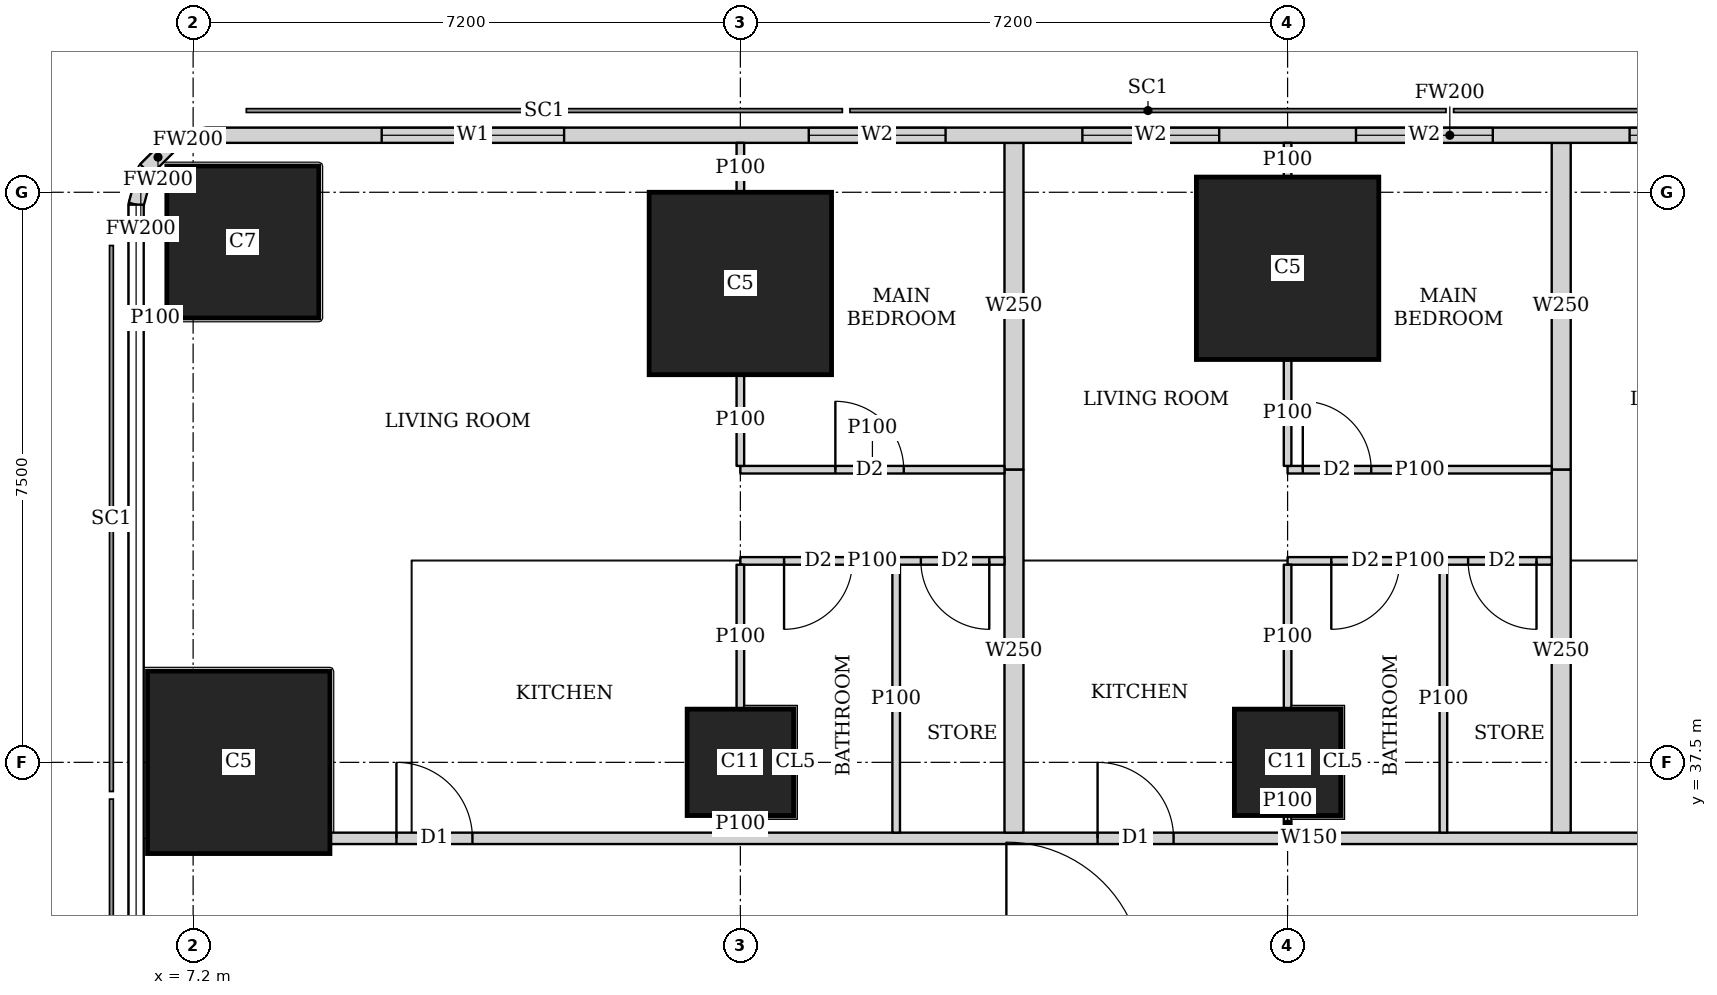
"""IFC4 building model, lengths in metres.
Left out: names, types, materials, properties, quantities, classifications, styles, units other than length and angle.
Written with IfcOpenShell. Run it as: python <this file> out.ifc"""

import sys

from ifc_helpers import new_model, si_unit, direction, frame, frame_2d, origin, origin_2d, place, context, subcontext, project, spatial, rectangle, extrude, element, fill, save


model = new_model("IFC4")
c1 = context("Model", 3, precision=1e-05, world=origin(), true_north=direction((0.0, 1.0)))
c2 = subcontext(c1, "Body", "Model", "MODEL_VIEW")
j1 = project(units=[si_unit("LENGTHUNIT", "METRE"), si_unit("PLANEANGLEUNIT", "RADIAN")], contexts=[c1])
p1 = place(None, origin())
s1 = spatial("IfcSite", under=j1, at=p1, CompositionType="ELEMENT")
p2 = place(p1, origin())
s2 = spatial("IfcBuilding", under=s1, at=p2, CompositionType="ELEMENT")
p3 = place(p2, frame((0.0, 0.0, 212.45)))
s3 = spatial("IfcBuildingStorey", under=s2, at=p3, CompositionType="ELEMENT", Elevation=212.45)
p4 = place(p3, frame((7.8, 37.5, 0.0), z_axis=(0.0, 0.0, 1.0), x_axis=(1.0, 0.0, 0.0)))
e1 = element("IfcColumn", 1, at=p4, inside=s3, PredefinedType="COLUMN", context=c2, shape_type="SweptSolid", body=[
    extrude(rectangle(XDim=2.4, YDim=2.4, at=origin_2d()), origin(), (0.0, 0.0, 1.0), 3.75),
])
for number, where, z_axis, x_axis in (
    (2, (14.4, 37.5, 0.0), (0.0, 0.0, 1.0), (1.0, 0.0, 0.0)),
    (3, (21.6, 37.5, 0.0), (0.0, 0.0, 1.0), (1.0, 0.0, 0.0)),
):
    element("IfcColumn", number, at=place(p3, frame(where, z_axis=z_axis, x_axis=x_axis)), inside=s3, PredefinedType="COLUMN", context=c2, shape_type="SweptSolid", body=[
        extrude(rectangle(XDim=1.4, YDim=1.4, at=origin_2d()), origin(), (0.0, 0.0, 1.0), 3.75),
    ])
p5 = place(p3, frame((7.854, 44.346, 0.0), z_axis=(0.0, 0.0, 1.0), x_axis=(1.0, 0.0, 0.0)))
e4 = element("IfcColumn", 4, at=p5, inside=s3, PredefinedType="COLUMN", context=c2, shape_type="SweptSolid", body=[
    extrude(rectangle(XDim=2.0, YDim=2.0, at=origin_2d()), origin(), (0.0, 0.0, 1.0), 3.75),
])
for number, where, z_axis, x_axis in (
    (5, (14.4, 43.8, 0.0), (0.0, 0.0, 1.0), (1.0, 0.0, 0.0)),
    (6, (21.6, 44.0, 0.0), (0.0, 0.0, 1.0), (1.0, 0.0, 0.0)),
):
    element("IfcColumn", number, at=place(p3, frame(where, z_axis=z_axis, x_axis=x_axis)), inside=s3, PredefinedType="COLUMN", context=c2, shape_type="SweptSolid", body=[
        extrude(rectangle(XDim=2.4, YDim=2.4, at=origin_2d()), origin(), (0.0, 0.0, 1.0), 3.75),
    ])
p6 = place(p3, frame((40.106, 45.75, 0.0), z_axis=(0.0, 0.0, 1.0), x_axis=(-1.0, 0.0, 0.0)))
e7 = element("IfcWall", 7, at=p6, inside=s3, PredefinedType="SOLIDWALL", context=c2, shape_type="SweptSolid", body=[
    extrude(rectangle(XDim=32.743, YDim=0.2, at=frame_2d((16.372, 0.0))), origin(), (0.0, 0.0, 1.0), 3.5),
])
p7 = place(p6, frame((8.606, 0.0, 0.9)))
e8 = element("IfcOpeningElement", 8, at=p7, cuts=e7, PredefinedType="OPENING", context=c2, shape_type="SweptSolid", body=[
    extrude(rectangle(XDim=1.8, YDim=1.5, at=frame_2d((0.9, 0.75))), frame((0.0, 0.11, 0.0), z_axis=(0.0, -1.0, 0.0), x_axis=(1.0, 0.0, 0.0)), (0.0, 0.0, 1.0), 0.22),
])
p8 = place(p6, frame((12.206, 0.0, 0.9)))
e9 = element("IfcOpeningElement", 9, at=p8, cuts=e7, PredefinedType="OPENING", context=c2, shape_type="SweptSolid", body=[
    extrude(rectangle(XDim=1.8, YDim=1.5, at=frame_2d((0.9, 0.75))), frame((0.0, 0.11, 0.0), z_axis=(0.0, -1.0, 0.0), x_axis=(1.0, 0.0, 0.0)), (0.0, 0.0, 1.0), 0.22),
])
p9 = place(p6, frame((15.806, 0.0, 0.9)))
e10 = element("IfcOpeningElement", 10, at=p9, cuts=e7, PredefinedType="OPENING", context=c2, shape_type="SweptSolid", body=[
    extrude(rectangle(XDim=1.8, YDim=1.5, at=frame_2d((0.9, 0.75))), frame((0.0, 0.11, 0.0), z_axis=(0.0, -1.0, 0.0), x_axis=(1.0, 0.0, 0.0)), (0.0, 0.0, 1.0), 0.22),
])
p10 = place(p6, frame((19.406, 0.0, 0.9)))
e11 = element("IfcOpeningElement", 11, at=p10, cuts=e7, PredefinedType="OPENING", context=c2, shape_type="SweptSolid", body=[
    extrude(rectangle(XDim=1.8, YDim=1.5, at=frame_2d((0.9, 0.75))), frame((0.0, 0.11, 0.0), z_axis=(0.0, -1.0, 0.0), x_axis=(1.0, 0.0, 0.0)), (0.0, 0.0, 1.0), 0.22),
])
p11 = place(p6, frame((23.006, 0.0, 0.9)))
e12 = element("IfcOpeningElement", 12, at=p11, cuts=e7, PredefinedType="OPENING", context=c2, shape_type="SweptSolid", body=[
    extrude(rectangle(XDim=1.8, YDim=1.5, at=frame_2d((0.9, 0.75))), frame((0.0, 0.11, 0.0), z_axis=(0.0, -1.0, 0.0), x_axis=(1.0, 0.0, 0.0)), (0.0, 0.0, 1.0), 0.22),
])
p12 = place(p6, frame((28.025, 0.0, 0.9)))
e13 = element("IfcOpeningElement", 13, at=p12, cuts=e7, PredefinedType="OPENING", context=c2, shape_type="SweptSolid", body=[
    extrude(rectangle(XDim=2.4, YDim=1.5, at=frame_2d((1.2, 0.75))), frame((0.0, 0.11, 0.0), z_axis=(0.0, -1.0, 0.0), x_axis=(1.0, 0.0, 0.0)), (0.0, 0.0, 1.0), 0.22),
])
p13 = place(p3, frame((7.363, 45.75, 0.0), z_axis=(0.0, 0.0, 1.0), x_axis=(-0.965655254015, -0.259826731483, 0.0)))
e14 = element("IfcWall", 14, at=p13, inside=s3, PredefinedType="SOLIDWALL", context=c2, shape_type="SweptSolid", body=[
    extrude(rectangle(XDim=0.477, YDim=0.2, at=frame_2d((0.239, 0.0))), origin(), (0.0, 0.0, 1.0), 3.5),
])
p14 = place(p3, frame((6.902, 45.626, 0.0), z_axis=(0.0, 0.0, 1.0), x_axis=(-0.707369890659, -0.706843573776, 0.0)))
e15 = element("IfcWall", 15, at=p14, inside=s3, PredefinedType="SOLIDWALL", context=c2, shape_type="SweptSolid", body=[
    extrude(rectangle(XDim=0.464, YDim=0.2, at=frame_2d((0.232, 0.0))), origin(), (0.0, 0.0, 1.0), 3.5),
])
p15 = place(p3, frame((6.574, 45.298, 0.0), z_axis=(0.0, 0.0, 1.0), x_axis=(-0.259698463175, -0.965689757751, 0.0)))
e16 = element("IfcWall", 16, at=p15, inside=s3, PredefinedType="SOLIDWALL", context=c2, shape_type="SweptSolid", body=[
    extrude(rectangle(XDim=0.478, YDim=0.2, at=frame_2d((0.239, 0.0))), origin(), (0.0, 0.0, 1.0), 3.5),
])
p16 = place(p3, frame((9.001, 36.5, 0.0), z_axis=(0.0, 0.0, 1.0), x_axis=(1.0, 0.0, 0.0)))
e17 = element("IfcWall", 17, at=p16, inside=s3, PredefinedType="SOLIDWALL", context=c2, shape_type="SweptSolid", body=[
    extrude(rectangle(XDim=25.764, YDim=0.15, at=frame_2d((12.882, 0.0))), origin(), (0.0, 0.0, 1.0), 3.5),
])
p17 = place(p16, frame((0.874, 0.0, 0.0)))
e18 = element("IfcOpeningElement", 18, at=p17, cuts=e17, PredefinedType="OPENING", context=c2, shape_type="SweptSolid", body=[
    extrude(rectangle(XDim=1.0, YDim=2.1, at=frame_2d((0.5, 1.05))), frame((0.0, 0.085, 0.0), z_axis=(0.0, -1.0, 0.0), x_axis=(1.0, 0.0, 0.0)), (0.0, 0.0, 1.0), 0.17),
])
p18 = place(p16, frame((10.099, 0.0, 0.0)))
e19 = element("IfcOpeningElement", 19, at=p18, cuts=e17, PredefinedType="OPENING", context=c2, shape_type="SweptSolid", body=[
    extrude(rectangle(XDim=1.0, YDim=2.1, at=frame_2d((0.5, 1.05))), frame((0.0, 0.085, 0.0), z_axis=(0.0, -1.0, 0.0), x_axis=(1.0, 0.0, 0.0)), (0.0, 0.0, 1.0), 0.17),
])
p19 = place(p16, frame((17.356, 0.0, 0.0)))
e20 = element("IfcOpeningElement", 20, at=p19, cuts=e17, PredefinedType="OPENING", context=c2, shape_type="SweptSolid", body=[
    extrude(rectangle(XDim=1.0, YDim=2.1, at=frame_2d((0.5, 1.05))), frame((0.0, 0.085, 0.0), z_axis=(0.0, -1.0, 0.0), x_axis=(1.0, 0.0, 0.0)), (0.0, 0.0, 1.0), 0.17),
])
p20 = place(p3, frame((6.854, 43.346, 0.0), z_axis=(0.0, 0.0, 1.0), x_axis=(-1.0, 0.0, 0.0)))
e21 = element("IfcWall", 21, at=p20, inside=s3, PredefinedType="PARTITIONING", context=c2, shape_type="SweptSolid", body=[
    extrude(rectangle(XDim=0.304, YDim=0.1, at=frame_2d((0.152, 0.0))), origin(), (0.0, 0.0, 1.0), 2.05),
])
p21 = place(p3, frame((14.4, 41.35, 0.0), z_axis=(0.0, 0.0, 1.0), x_axis=(1.0, 0.0, 0.0)))
e22 = element("IfcWall", 22, at=p21, inside=s3, PredefinedType="PARTITIONING", context=c2, shape_type="SweptSolid", body=[
    extrude(rectangle(XDim=3.475, YDim=0.1, at=frame_2d((1.738, 0.0))), origin(), (0.0, 0.0, 1.0), 3.5),
])
p22 = place(p21, frame((1.25, 0.0, 0.0)))
e23 = element("IfcOpeningElement", 23, at=p22, cuts=e22, PredefinedType="OPENING", context=c2, shape_type="SweptSolid", body=[
    extrude(rectangle(XDim=0.9, YDim=2.1, at=frame_2d((0.45, 1.05))), frame((0.0, 0.06, 0.0), z_axis=(0.0, -1.0, 0.0), x_axis=(1.0, 0.0, 0.0)), (0.0, 0.0, 1.0), 0.12),
])
p23 = place(p3, frame((14.4, 40.15, 0.0), z_axis=(0.0, 0.0, 1.0), x_axis=(1.0, 0.0, 0.0)))
e24 = element("IfcWall", 24, at=p23, inside=s3, PredefinedType="PARTITIONING", context=c2, shape_type="SweptSolid", body=[
    extrude(rectangle(XDim=3.475, YDim=0.1, at=frame_2d((1.738, 0.0))), origin(), (0.0, 0.0, 1.0), 3.5),
])
p24 = place(p23, frame((0.575, 0.0, 0.0)))
e25 = element("IfcOpeningElement", 25, at=p24, cuts=e24, PredefinedType="OPENING", context=c2, shape_type="SweptSolid", body=[
    extrude(rectangle(XDim=0.9, YDim=2.1, at=frame_2d((0.45, 1.05))), frame((0.0, 0.06, 0.0), z_axis=(0.0, -1.0, 0.0), x_axis=(1.0, 0.0, 0.0)), (0.0, 0.0, 1.0), 0.12),
])
p25 = place(p23, frame((2.375, 0.0, 0.0)))
e26 = element("IfcOpeningElement", 26, at=p25, cuts=e24, PredefinedType="OPENING", context=c2, shape_type="SweptSolid", body=[
    extrude(rectangle(XDim=0.9, YDim=2.1, at=frame_2d((0.45, 1.05))), frame((0.0, 0.06, 0.0), z_axis=(0.0, -1.0, 0.0), x_axis=(1.0, 0.0, 0.0)), (0.0, 0.0, 1.0), 0.12),
])
p26 = place(p3, frame((14.4, 41.4, 0.0), z_axis=(0.0, 0.0, 1.0), x_axis=(0.0, 1.0, 0.0)))
e27 = element("IfcWall", 27, at=p26, inside=s3, PredefinedType="PARTITIONING", context=c2, shape_type="SweptSolid", body=[
    extrude(rectangle(XDim=1.199, YDim=0.1, at=frame_2d((0.6, 0.0))), origin(), (0.0, 0.0, 1.0), 3.5),
])
p27 = place(p3, frame((14.4, 45.001, 0.0), z_axis=(0.0, 0.0, 1.0), x_axis=(0.0, 1.0, 0.0)))
e28 = element("IfcWall", 28, at=p27, inside=s3, PredefinedType="PARTITIONING", context=c2, shape_type="SweptSolid", body=[
    extrude(rectangle(XDim=0.649, YDim=0.1, at=frame_2d((0.324, 0.0))), origin(), (0.0, 0.0, 1.0), 3.5),
])
p28 = place(p3, frame((14.4, 36.575, 0.0), z_axis=(0.0, 0.0, 1.0), x_axis=(0.0, 1.0, 0.0)))
e29 = element("IfcWall", 29, at=p28, inside=s3, PredefinedType="PARTITIONING", context=c2, shape_type="SweptSolid", body=[
    extrude(rectangle(XDim=0.224, YDim=0.1, at=frame_2d((0.112, 0.0))), origin(), (0.0, 0.0, 1.0), 3.5),
])
p29 = place(p3, frame((14.4, 38.201, 0.0), z_axis=(0.0, 0.0, 1.0), x_axis=(0.0, 1.0, 0.0)))
e30 = element("IfcWall", 30, at=p29, inside=s3, PredefinedType="PARTITIONING", context=c2, shape_type="SweptSolid", body=[
    extrude(rectangle(XDim=1.899, YDim=0.1, at=frame_2d((0.95, 0.0))), origin(), (0.0, 0.0, 1.0), 3.5),
])
p30 = place(p3, frame((16.45, 36.575, 0.0), z_axis=(0.0, 0.0, 1.0), x_axis=(0.0, 1.0, 0.0)))
e31 = element("IfcWall", 31, at=p30, inside=s3, PredefinedType="PARTITIONING", context=c2, shape_type="SweptSolid", body=[
    extrude(rectangle(XDim=3.525, YDim=0.1, at=frame_2d((1.763, 0.0))), origin(), (0.0, 0.0, 1.0), 3.5),
])
p31 = place(p3, frame((21.6, 41.35, 0.0), z_axis=(0.0, 0.0, 1.0), x_axis=(1.0, 0.0, 0.0)))
e32 = element("IfcWall", 32, at=p31, inside=s3, PredefinedType="PARTITIONING", context=c2, shape_type="SweptSolid", body=[
    extrude(rectangle(XDim=3.475, YDim=0.1, at=frame_2d((1.737, 0.0))), origin(), (0.0, 0.0, 1.0), 3.5),
])
p32 = place(p31, frame((0.2, 0.0, 0.0)))
e33 = element("IfcOpeningElement", 33, at=p32, cuts=e32, PredefinedType="OPENING", context=c2, shape_type="SweptSolid", body=[
    extrude(rectangle(XDim=0.9, YDim=2.1, at=frame_2d((0.45, 1.05))), frame((0.0, 0.06, 0.0), z_axis=(0.0, -1.0, 0.0), x_axis=(1.0, 0.0, 0.0)), (0.0, 0.0, 1.0), 0.12),
])
p33 = place(p3, frame((21.6, 40.15, 0.0), z_axis=(0.0, 0.0, 1.0), x_axis=(1.0, 0.0, 0.0)))
e34 = element("IfcWall", 34, at=p33, inside=s3, PredefinedType="PARTITIONING", context=c2, shape_type="SweptSolid", body=[
    extrude(rectangle(XDim=3.475, YDim=0.1, at=frame_2d((1.737, 0.0))), origin(), (0.0, 0.0, 1.0), 3.5),
])
p34 = place(p33, frame((0.575, 0.0, 0.0)))
e35 = element("IfcOpeningElement", 35, at=p34, cuts=e34, PredefinedType="OPENING", context=c2, shape_type="SweptSolid", body=[
    extrude(rectangle(XDim=0.9, YDim=2.1, at=frame_2d((0.45, 1.05))), frame((0.0, 0.06, 0.0), z_axis=(0.0, -1.0, 0.0), x_axis=(1.0, 0.0, 0.0)), (0.0, 0.0, 1.0), 0.12),
])
p35 = place(p33, frame((2.375, 0.0, 0.0)))
e36 = element("IfcOpeningElement", 36, at=p35, cuts=e34, PredefinedType="OPENING", context=c2, shape_type="SweptSolid", body=[
    extrude(rectangle(XDim=0.9, YDim=2.1, at=frame_2d((0.45, 1.05))), frame((0.0, 0.06, 0.0), z_axis=(0.0, -1.0, 0.0), x_axis=(1.0, 0.0, 0.0)), (0.0, 0.0, 1.0), 0.12),
])
p36 = place(p3, frame((21.6, 41.4, 0.0), z_axis=(0.0, 0.0, 1.0), x_axis=(0.0, 1.0, 0.0)))
e37 = element("IfcWall", 37, at=p36, inside=s3, PredefinedType="PARTITIONING", context=c2, shape_type="SweptSolid", body=[
    extrude(rectangle(XDim=1.399, YDim=0.1, at=frame_2d((0.7, 0.0))), origin(), (0.0, 0.0, 1.0), 3.5),
])
p37 = place(p3, frame((21.6, 45.201, 0.0), z_axis=(0.0, 0.0, 1.0), x_axis=(0.0, 1.0, 0.0)))
e38 = element("IfcWall", 38, at=p37, inside=s3, PredefinedType="PARTITIONING", context=c2, shape_type="SweptSolid", body=[
    extrude(rectangle(XDim=0.449, YDim=0.1, at=frame_2d((0.225, 0.0))), origin(), (0.0, 0.0, 1.0), 3.5),
])
p38 = place(p3, frame((21.6, 36.575, 0.0), z_axis=(0.0, 0.0, 1.0), x_axis=(0.0, 1.0, 0.0)))
e39 = element("IfcWall", 39, at=p38, inside=s3, PredefinedType="PARTITIONING", context=c2, shape_type="SweptSolid", body=[
    extrude(rectangle(XDim=0.224, YDim=0.1, at=frame_2d((0.112, 0.0))), origin(), (0.0, 0.0, 1.0), 3.5),
])
p39 = place(p3, frame((21.6, 38.201, 0.0), z_axis=(0.0, 0.0, 1.0), x_axis=(0.0, 1.0, 0.0)))
e40 = element("IfcWall", 40, at=p39, inside=s3, PredefinedType="PARTITIONING", context=c2, shape_type="SweptSolid", body=[
    extrude(rectangle(XDim=1.899, YDim=0.1, at=frame_2d((0.95, 0.0))), origin(), (0.0, 0.0, 1.0), 3.5),
])
p40 = place(p3, frame((23.65, 36.575, 0.0), z_axis=(0.0, 0.0, 1.0), x_axis=(0.0, 1.0, 0.0)))
e41 = element("IfcWall", 41, at=p40, inside=s3, PredefinedType="PARTITIONING", context=c2, shape_type="SweptSolid", body=[
    extrude(rectangle(XDim=3.525, YDim=0.1, at=frame_2d((1.763, 0.0))), origin(), (0.0, 0.0, 1.0), 3.5),
])
p41 = place(p3, frame((18.0, 41.35, 0.0), z_axis=(0.0, 0.0, 1.0), x_axis=(0.0, 1.0, 0.0)))
e42 = element("IfcWall", 42, at=p41, inside=s3, PredefinedType="SOLIDWALL", context=c2, shape_type="SweptSolid", body=[
    extrude(rectangle(XDim=4.3, YDim=0.25, at=frame_2d((2.15, 0.0))), origin(), (0.0, 0.0, 1.0), 2.05),
])
p42 = place(p3, frame((18.0, 36.575, 0.0), z_axis=(0.0, 0.0, 1.0), x_axis=(0.0, 1.0, 0.0)))
e43 = element("IfcWall", 43, at=p42, inside=s3, PredefinedType="SOLIDWALL", context=c2, shape_type="SweptSolid", body=[
    extrude(rectangle(XDim=4.775, YDim=0.25, at=frame_2d((2.388, 0.0))), origin(), (0.0, 0.0, 1.0), 3.5),
])
p43 = place(p3, frame((25.2, 41.35, 0.0), z_axis=(0.0, 0.0, 1.0), x_axis=(0.0, 1.0, 0.0)))
e44 = element("IfcWall", 44, at=p43, inside=s3, PredefinedType="SOLIDWALL", context=c2, shape_type="SweptSolid", body=[
    extrude(rectangle(XDim=4.3, YDim=0.25, at=frame_2d((2.15, 0.0))), origin(), (0.0, 0.0, 1.0), 2.05),
])
p44 = place(p3, frame((25.2, 36.575, 0.0), z_axis=(0.0, 0.0, 1.0), x_axis=(0.0, 1.0, 0.0)))
e45 = element("IfcWall", 45, at=p44, inside=s3, PredefinedType="SOLIDWALL", context=c2, shape_type="SweptSolid", body=[
    extrude(rectangle(XDim=4.775, YDim=0.25, at=frame_2d((2.388, 0.0))), origin(), (0.0, 0.0, 1.0), 3.5),
])
p45 = place(p8, origin())
e46 = element("IfcWindow", 46, at=p45, inside=s3, PartitioningType="SINGLE_PANEL", PredefinedType="WINDOW", context=c2, shape_type="SweptSolid", body=[
    extrude(rectangle(XDim=1.8, YDim=1.5, at=frame_2d((0.9, 0.75))), frame((0.0, 0.03, 0.0), z_axis=(0.0, -1.0, 0.0), x_axis=(1.0, 0.0, 0.0)), (0.0, 0.0, 1.0), 0.06),
])
fill(e9, e46)
p46 = place(p9, origin())
e47 = element("IfcWindow", 47, at=p46, inside=s3, PartitioningType="SINGLE_PANEL", PredefinedType="WINDOW", context=c2, shape_type="SweptSolid", body=[
    extrude(rectangle(XDim=1.8, YDim=1.5, at=frame_2d((0.9, 0.75))), frame((0.0, 0.03, 0.0), z_axis=(0.0, -1.0, 0.0), x_axis=(1.0, 0.0, 0.0)), (0.0, 0.0, 1.0), 0.06),
])
fill(e10, e47)
p47 = place(p10, origin())
e48 = element("IfcWindow", 48, at=p47, inside=s3, PartitioningType="SINGLE_PANEL", PredefinedType="WINDOW", context=c2, shape_type="SweptSolid", body=[
    extrude(rectangle(XDim=1.8, YDim=1.5, at=frame_2d((0.9, 0.75))), frame((0.0, 0.03, 0.0), z_axis=(0.0, -1.0, 0.0), x_axis=(1.0, 0.0, 0.0)), (0.0, 0.0, 1.0), 0.06),
])
fill(e11, e48)
p48 = place(p11, origin())
e49 = element("IfcWindow", 49, at=p48, inside=s3, PartitioningType="SINGLE_PANEL", PredefinedType="WINDOW", context=c2, shape_type="SweptSolid", body=[
    extrude(rectangle(XDim=1.8, YDim=1.5, at=frame_2d((0.9, 0.75))), frame((0.0, 0.03, 0.0), z_axis=(0.0, -1.0, 0.0), x_axis=(1.0, 0.0, 0.0)), (0.0, 0.0, 1.0), 0.06),
])
fill(e12, e49)
p49 = place(p12, origin())
e50 = element("IfcWindow", 50, at=p49, inside=s3, PartitioningType="SINGLE_PANEL", PredefinedType="WINDOW", context=c2, shape_type="SweptSolid", body=[
    extrude(rectangle(XDim=2.4, YDim=1.5, at=frame_2d((1.2, 0.75))), frame((0.0, 0.03, 0.0), z_axis=(0.0, -1.0, 0.0), x_axis=(1.0, 0.0, 0.0)), (0.0, 0.0, 1.0), 0.06),
])
fill(e13, e50)
p50 = place(p22, origin())
e51 = element("IfcDoor", 51, at=p50, inside=s3, OperationType="SINGLE_SWING_LEFT", PredefinedType="DOOR", context=c2, shape_type="SweptSolid", body=[
    extrude(rectangle(XDim=0.9, YDim=2.1, at=frame_2d((0.45, 1.05))), frame((0.0, 0.025, 0.0), z_axis=(0.0, -1.0, 0.0), x_axis=(1.0, 0.0, 0.0)), (0.0, 0.0, 1.0), 0.05),
])
fill(e23, e51)
p51 = place(p24, origin())
e52 = element("IfcDoor", 52, at=p51, inside=s3, OperationType="SINGLE_SWING_RIGHT", PredefinedType="DOOR", context=c2, shape_type="SweptSolid", body=[
    extrude(rectangle(XDim=0.9, YDim=2.1, at=frame_2d((0.45, 1.05))), frame((0.0, 0.025, 0.0), z_axis=(0.0, -1.0, 0.0), x_axis=(1.0, 0.0, 0.0)), (0.0, 0.0, 1.0), 0.05),
])
fill(e25, e52)
p52 = place(p25, origin())
e53 = element("IfcDoor", 53, at=p52, inside=s3, OperationType="SINGLE_SWING_LEFT", PredefinedType="DOOR", context=c2, shape_type="SweptSolid", body=[
    extrude(rectangle(XDim=0.9, YDim=2.1, at=frame_2d((0.45, 1.05))), frame((0.0, 0.025, 0.0), z_axis=(0.0, -1.0, 0.0), x_axis=(1.0, 0.0, 0.0)), (0.0, 0.0, 1.0), 0.05),
])
fill(e26, e53)
p53 = place(p17, origin())
e54 = element("IfcDoor", 54, at=p53, inside=s3, OperationType="SINGLE_SWING_LEFT", PredefinedType="DOOR", context=c2, shape_type="SweptSolid", body=[
    extrude(rectangle(XDim=1.0, YDim=2.1, at=frame_2d((0.5, 1.05))), frame((0.0, 0.025, 0.0), z_axis=(0.0, -1.0, 0.0), x_axis=(1.0, 0.0, 0.0)), (0.0, 0.0, 1.0), 0.05),
])
fill(e18, e54)
p54 = place(p32, origin())
e55 = element("IfcDoor", 55, at=p54, inside=s3, OperationType="SINGLE_SWING_LEFT", PredefinedType="DOOR", context=c2, shape_type="SweptSolid", body=[
    extrude(rectangle(XDim=0.9, YDim=2.1, at=frame_2d((0.45, 1.05))), frame((0.0, 0.025, 0.0), z_axis=(0.0, -1.0, 0.0), x_axis=(1.0, 0.0, 0.0)), (0.0, 0.0, 1.0), 0.05),
])
fill(e33, e55)
p55 = place(p34, origin())
e56 = element("IfcDoor", 56, at=p55, inside=s3, OperationType="SINGLE_SWING_RIGHT", PredefinedType="DOOR", context=c2, shape_type="SweptSolid", body=[
    extrude(rectangle(XDim=0.9, YDim=2.1, at=frame_2d((0.45, 1.05))), frame((0.0, 0.025, 0.0), z_axis=(0.0, -1.0, 0.0), x_axis=(1.0, 0.0, 0.0)), (0.0, 0.0, 1.0), 0.05),
])
fill(e35, e56)
p56 = place(p35, origin())
e57 = element("IfcDoor", 57, at=p56, inside=s3, OperationType="SINGLE_SWING_LEFT", PredefinedType="DOOR", context=c2, shape_type="SweptSolid", body=[
    extrude(rectangle(XDim=0.9, YDim=2.1, at=frame_2d((0.45, 1.05))), frame((0.0, 0.025, 0.0), z_axis=(0.0, -1.0, 0.0), x_axis=(1.0, 0.0, 0.0)), (0.0, 0.0, 1.0), 0.05),
])
fill(e36, e57)
p57 = place(p18, origin())
e58 = element("IfcDoor", 58, at=p57, inside=s3, OperationType="SINGLE_SWING_LEFT", PredefinedType="DOOR", context=c2, shape_type="SweptSolid", body=[
    extrude(rectangle(XDim=1.0, YDim=2.1, at=frame_2d((0.5, 1.05))), frame((0.0, 0.025, 0.0), z_axis=(0.0, -1.0, 0.0), x_axis=(1.0, 0.0, 0.0)), (0.0, 0.0, 1.0), 0.05),
])
fill(e19, e58)
save(model, sys.argv[1])
